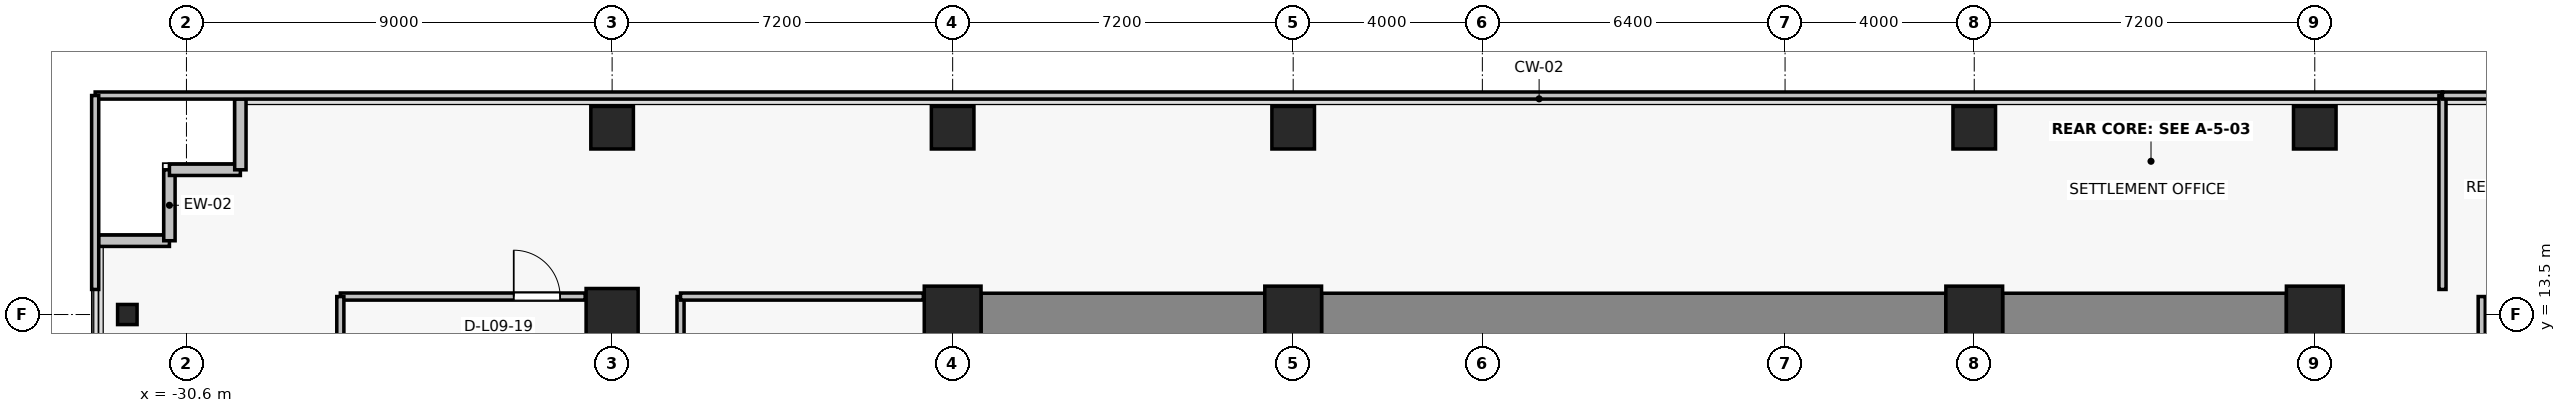
"""IFC4 building model, lengths in metres.
Left out: names, types, materials, properties, quantities, classifications, styles, units other than length and angle.
Written with IfcOpenShell. Run it as: python <this file> out.ifc"""

import sys

from ifc_helpers import new_model, si_unit, direction, frame, frame_2d, origin, origin_2d, place, context, subcontext, project, spatial, rectangle, i_section, extrude, source, transform, mapped, element, fill, save


model = new_model("IFC4")
c1 = context("Model", 3, precision=1e-05, world=origin(), true_north=direction((0.0, 1.0)))
c2 = subcontext(c1, "Body", "Model", "MODEL_VIEW")
j1 = project(units=[si_unit("LENGTHUNIT", "METRE"), si_unit("PLANEANGLEUNIT", "RADIAN")], contexts=[c1])
p1 = place(None, origin())
s1 = spatial("IfcSite", under=j1, at=p1, CompositionType="ELEMENT")
p2 = place(p1, origin())
s2 = spatial("IfcBuilding", under=s1, at=p2, CompositionType="ELEMENT")
p3 = place(p2, frame((0.0, 0.0, 37.3)))
s3 = spatial("IfcBuildingStorey", under=s2, at=p3, CompositionType="ELEMENT", Elevation=37.3)
for number, where, z_axis, x_axis in (
    (1, (-14.4, 13.5, 0.0), (0.0, 0.0, 1.0), (1.0, 0.0, 0.0)),
    (2, (-7.2, 13.5, 0.0), (0.0, 0.0, 1.0), (1.0, 0.0, 0.0)),
    (3, (7.2, 13.5, 0.0), (0.0, 0.0, 1.0), (1.0, 0.0, 0.0)),
    (4, (14.4, 13.5, 0.0), (0.0, 0.0, 1.0), (1.0, 0.0, 0.0)),
):
    element("IfcColumn", number, at=place(p3, frame(where, z_axis=z_axis, x_axis=x_axis)), inside=s3, PredefinedType="COLUMN", context=c2, shape_type="SweptSolid", body=[
        extrude(rectangle(XDim=1.2, YDim=1.2, at=origin_2d()), origin(), (0.0, 0.0, 1.0), 3.3),
    ])
p4 = place(p3, frame((-21.6, 13.5, 0.0), z_axis=(0.0, 0.0, 1.0), x_axis=(1.0, 0.0, 0.0)))
e5 = element("IfcColumn", 5, at=p4, inside=s3, PredefinedType="COLUMN", context=c2, shape_type="SweptSolid", body=[
    extrude(rectangle(XDim=1.1, YDim=1.1, at=origin_2d()), origin(), (0.0, 0.0, 1.0), 3.3),
])
for number, where, z_axis, x_axis in (
    (6, (-14.4, 17.45, 0.0), (0.0, 0.0, 1.0), (1.0, 0.0, 0.0)),
    (7, (-7.2, 17.45, 0.0), (0.0, 0.0, 1.0), (1.0, 0.0, 0.0)),
    (8, (7.2, 17.45, 0.0), (0.0, 0.0, 1.0), (1.0, 0.0, 0.0)),
    (9, (14.4, 17.45, 0.0), (0.0, 0.0, 1.0), (1.0, 0.0, 0.0)),
    (10, (-21.6, 17.45, 0.0), (0.0, 0.0, 1.0), (1.0, 0.0, 0.0)),
):
    element("IfcColumn", number, at=place(p3, frame(where, z_axis=z_axis, x_axis=x_axis)), inside=s3, PredefinedType="COLUMN", context=c2, shape_type="SweptSolid", body=[
        extrude(rectangle(XDim=0.9, YDim=0.9, at=origin_2d()), origin(), (0.0, 0.0, 1.0), 3.3),
    ])
p5 = place(p3, frame((-31.85, 13.5, 0.0), z_axis=(0.0, 0.0, 1.0), x_axis=(1.0, 0.0, 0.0)))
e11 = element("IfcColumn", 11, at=p5, inside=s3, PredefinedType="COLUMN", context=c2, shape_type="SweptSolid", body=[
    extrude(i_section(OverallWidth=0.412, OverallDepth=0.425, WebThickness=0.026, FlangeThickness=0.039, FilletRadius=0.015, at=origin_2d()), origin(), (0.0, 0.0, 1.0), 3.3),
])
p6 = place(p3, frame((-13.8, 13.5, 0.0), z_axis=(0.0, 0.0, 1.0), x_axis=(1.0, 0.0, 0.0)))
e12 = element("IfcWall", 12, at=p6, inside=s3, PredefinedType="SHEAR", context=c2, shape_type="SweptSolid", body=[
    extrude(rectangle(XDim=6.0, YDim=0.9, at=frame_2d((3.0, 0.0))), origin(), (0.0, 0.0, 1.0), 3.075),
])
p7 = place(p3, frame((-6.6, 13.5, 0.0), z_axis=(0.0, 0.0, 1.0), x_axis=(1.0, 0.0, 0.0)))
e13 = element("IfcWall", 13, at=p7, inside=s3, PredefinedType="SHEAR", context=c2, shape_type="SweptSolid", body=[
    extrude(rectangle(XDim=13.2, YDim=0.9, at=frame_2d((6.6, 0.0))), origin(), (0.0, 0.0, 1.0), 3.075),
])
p8 = place(p3, frame((7.8, 13.5, 0.0), z_axis=(0.0, 0.0, 1.0), x_axis=(1.0, 0.0, 0.0)))
e14 = element("IfcWall", 14, at=p8, inside=s3, PredefinedType="SHEAR", context=c2, shape_type="SweptSolid", body=[
    extrude(rectangle(XDim=6.0, YDim=0.9, at=frame_2d((3.0, 0.0))), origin(), (0.0, 0.0, 1.0), 3.075),
])
for number, where, z_axis, x_axis in (
    (15, (-30.96, 15.06, 0.0), (0.0, 0.0, 1.0), (-1.0, 0.0, 0.0)),
    (16, (-30.96, 16.56, 0.0), (0.0, 0.0, 1.0), (0.0, -1.0, 0.0)),
    (17, (-29.46, 16.56, 0.0), (0.0, 0.0, 1.0), (-1.0, 0.0, 0.0)),
    (18, (-29.46, 18.06, 0.0), (0.0, 0.0, 1.0), (0.0, -1.0, 0.0)),
):
    element("IfcWall", number, at=place(p3, frame(where, z_axis=z_axis, x_axis=x_axis)), inside=s3, PredefinedType="SOLIDWALL", context=c2, shape_type="SweptSolid", body=[
        extrude(rectangle(XDim=1.5, YDim=0.24, at=frame_2d((0.75, 0.0))), origin(), (0.0, 0.0, 1.0), 3.075),
    ])
p9 = place(p3, frame((-27.346, 13.88, 0.0), z_axis=(0.0, 0.0, 1.0), x_axis=(1.0, 0.0, 0.0)))
e19 = element("IfcWall", 19, at=p9, inside=s3, PredefinedType="PARTITIONING", context=c2, shape_type="SweptSolid", body=[
    extrude(rectangle(XDim=5.177, YDim=0.15, at=frame_2d((2.588, 0.0))), origin(), (0.0, 0.0, 1.0), 3.075),
])
p10 = place(p9, frame((3.667, 0.0, 0.0)))
e20 = element("IfcOpeningElement", 20, at=p10, cuts=e19, PredefinedType="OPENING", context=c2, shape_type="SweptSolid", body=[
    extrude(rectangle(XDim=0.98, YDim=2.15, at=frame_2d((0.49, 1.075))), frame((0.0, 0.085, 0.0), z_axis=(0.0, -1.0, 0.0), x_axis=(1.0, 0.0, 0.0)), (0.0, 0.0, 1.0), 0.17),
])
for number, where, z_axis, x_axis in (
    (21, (-27.346, -1.77, 0.0), (0.0, 0.0, 1.0), (0.0, 1.0, 0.0)),
    (22, (-20.154, 13.88, 0.0), (0.0, 0.0, 1.0), (0.0, -1.0, 0.0)),
):
    element("IfcWall", number, at=place(p3, frame(where, z_axis=z_axis, x_axis=x_axis)), inside=s3, PredefinedType="PARTITIONING", context=c2, shape_type="SweptSolid", body=[
        extrude(rectangle(XDim=15.65, YDim=0.15, at=frame_2d((7.825, 0.0))), origin(), (0.0, 0.0, 1.0), 2.465),
    ])
p11 = place(p3, frame((-20.154, 13.88, 0.0), z_axis=(0.0, 0.0, 1.0), x_axis=(1.0, 0.0, 0.0)))
e23 = element("IfcWall", 23, at=p11, inside=s3, PredefinedType="PARTITIONING", context=c2, shape_type="SweptSolid", body=[
    extrude(rectangle(XDim=5.134, YDim=0.15, at=frame_2d((2.567, 0.0))), origin(), (0.0, 0.0, 1.0), 3.075),
])
p12 = place(p3, frame((17.93, 7.333, 0.0), z_axis=(0.0, 0.0, 1.0), x_axis=(0.0, 1.0, 0.0)))
e24 = element("IfcWall", 24, at=p12, inside=s3, PredefinedType="PARTITIONING", context=c2, shape_type="SweptSolid", body=[
    extrude(rectangle(XDim=6.547, YDim=0.15, at=frame_2d((3.274, 0.0))), origin(), (0.0, 0.0, 1.0), 2.465),
])
p13 = place(p12, frame((2.783, 0.0, 0.0)))
e25 = element("IfcOpeningElement", 25, at=p13, cuts=e24, PredefinedType="OPENING", context=c2, shape_type="SweptSolid", body=[
    extrude(rectangle(XDim=0.98, YDim=2.15, at=frame_2d((0.49, 1.075))), frame((0.0, 0.085, 0.0), z_axis=(0.0, -1.0, 0.0), x_axis=(1.0, 0.0, 0.0)), (0.0, 0.0, 1.0), 0.17),
])
p14 = place(p3, frame((-32.53, 18.13, 0.0), z_axis=(0.0, 0.0, 1.0), x_axis=(1.0, 0.0, 0.0)))
e26 = element("IfcWall", 26, at=p14, inside=s3, PredefinedType="PARTITIONING", context=c2, shape_type="SweptSolid", body=[
    extrude(rectangle(XDim=49.63, YDim=0.15, at=frame_2d((24.815, 0.0))), origin(), (0.0, 0.0, 1.0), 3.075),
])
p15 = place(p3, frame((-32.53, 14.03, 0.0), z_axis=(0.0, 0.0, 1.0), x_axis=(0.0, 1.0, 0.0)))
e27 = element("IfcWall", 27, at=p15, inside=s3, PredefinedType="PARTITIONING", context=c2, shape_type="SweptSolid", body=[
    extrude(rectangle(XDim=4.1, YDim=0.15, at=frame_2d((2.05, 0.0))), origin(), (0.0, 0.0, 1.0), 3.075),
])
p16 = place(p3, frame((17.1, 18.13, 0.0), z_axis=(0.0, 0.0, 1.0), x_axis=(0.0, -1.0, 0.0)))
e28 = element("IfcWall", 28, at=p16, inside=s3, PredefinedType="PARTITIONING", context=c2, shape_type="SweptSolid", body=[
    extrude(rectangle(XDim=4.1, YDim=0.15, at=frame_2d((2.05, 0.0))), origin(), (0.0, 0.0, 1.0), 2.465),
])
p17 = place(p3, frame((17.1, 18.13, 0.0), z_axis=(0.0, 0.0, 1.0), x_axis=(1.0, 0.0, 0.0)))
e29 = element("IfcWall", 29, at=p17, inside=s3, PredefinedType="PARTITIONING", context=c2, shape_type="SweptSolid", body=[
    extrude(rectangle(XDim=11.43, YDim=0.15, at=frame_2d((5.715, 0.0))), origin(), (0.0, 0.0, 1.0), 3.075),
])
m1 = source(origin(), c2, "Body", "SweptSolid", [
    extrude(rectangle(XDim=0.98, YDim=2.15, at=frame_2d((0.49, 1.075))), frame((0.0, 0.025, 0.0), z_axis=(0.0, -1.0, 0.0), x_axis=(1.0, 0.0, 0.0)), (0.0, 0.0, 1.0), 0.05),
])
p18 = place(p10, origin())
e30 = element("IfcDoor", 30, at=p18, inside=s3, OperationType="SINGLE_SWING_LEFT", PredefinedType="DOOR", context=c2, shape_type="MappedRepresentation", body=[
    mapped(m1, transform((0.0, 0.0, 0.0), x_axis=(1.0, 0.0, 0.0), y_axis=(0.0, 1.0, 0.0), z_axis=(0.0, 0.0, 1.0), scale=1.0)),
])
fill(e20, e30)
save(model, sys.argv[1])
